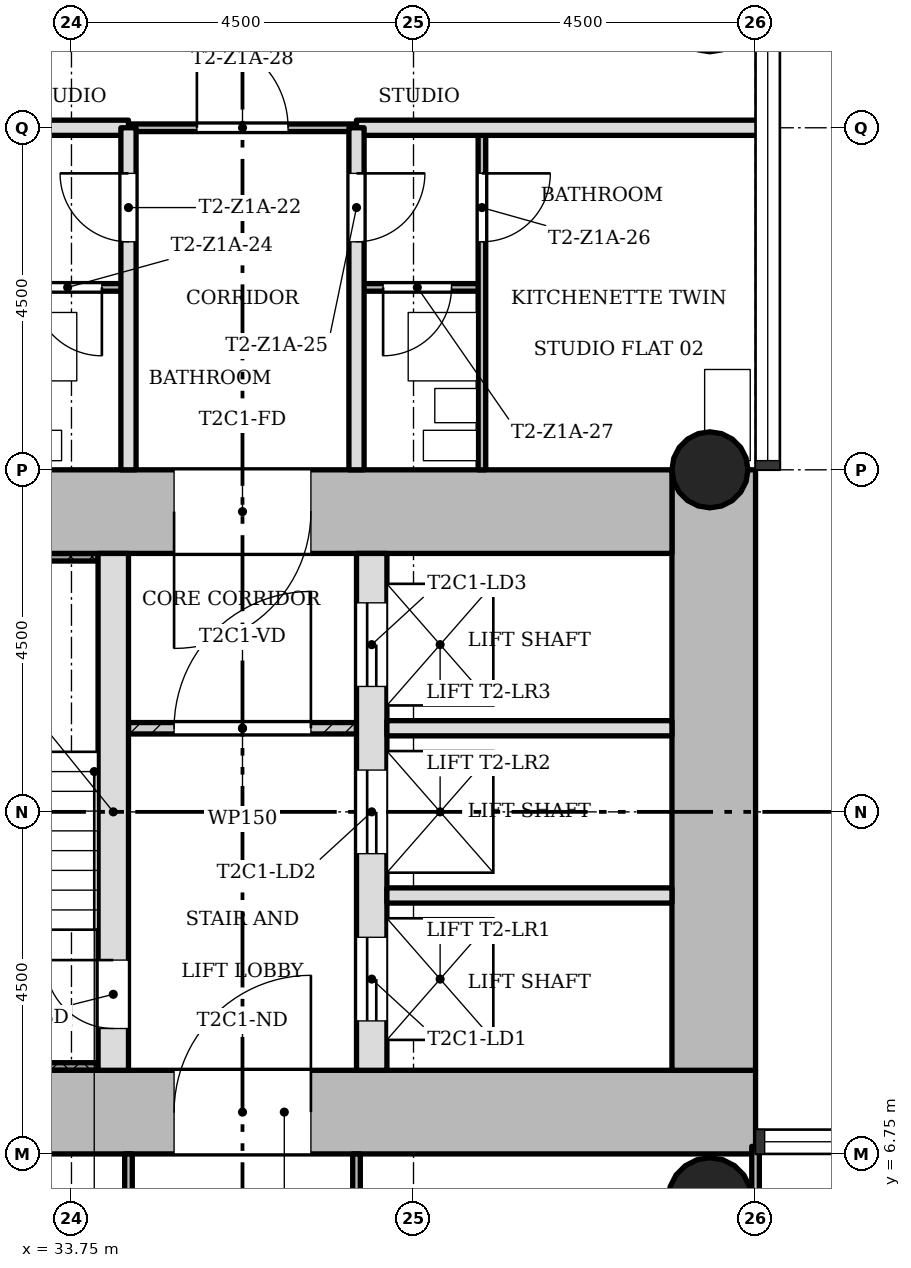
"""IFC4 building model, lengths in metres.
Left out: names, types, materials, properties, quantities, classifications, styles, units other than length and angle.
Written with IfcOpenShell. Run it as: python <this file> out.ifc"""

import sys

from ifc_helpers import new_model, si_unit, direction, frame, frame_2d, origin, origin_2d, place, context, subcontext, project, spatial, rectangle, hollow_circle, extrude, element, fill, save


model = new_model("IFC4")
c1 = context("Model", 3, precision=1e-05, world=origin(), true_north=direction((0.0, 1.0)))
c2 = subcontext(c1, "Body", "Model", "MODEL_VIEW")
j1 = project(units=[si_unit("LENGTHUNIT", "METRE"), si_unit("PLANEANGLEUNIT", "RADIAN")], contexts=[c1])
p1 = place(None, origin())
s1 = spatial("IfcSite", under=j1, at=p1, CompositionType="ELEMENT")
p2 = place(p1, origin())
s2 = spatial("IfcBuilding", under=s1, at=p2, CompositionType="ELEMENT")
p3 = place(p2, frame((0.0, 0.0, 27.9)))
s3 = spatial("IfcBuildingStorey", under=s2, at=p3, CompositionType="ELEMENT", Elevation=27.9)
p4 = place(p3, frame((30.35, 7.3, 0.0), z_axis=(0.0, 0.0, 1.0), x_axis=(1.0, 0.0, 0.0)))
e1 = element("IfcWall", 1, at=p4, inside=s3, PredefinedType="SHEAR", context=c2, shape_type="SweptSolid", body=[
    extrude(rectangle(XDim=12.4, YDim=1.1, at=frame_2d((6.2, 0.0))), origin(), (0.0, 0.0, 1.0), 3.4),
])
p5 = place(p4, frame((4.75, 0.0, 0.0)))
e2 = element("IfcOpeningElement", 2, at=p5, cuts=e1, PredefinedType="OPENING", context=c2, shape_type="SweptSolid", body=[
    extrude(rectangle(XDim=1.8, YDim=2.1, at=frame_2d((0.9, 1.05))), frame((0.0, 0.56, 0.0), z_axis=(0.0, -1.0, 0.0), x_axis=(1.0, 0.0, 0.0)), (0.0, 0.0, 1.0), 1.12),
])
p6 = place(p3, frame((42.2, 7.85, 0.0), z_axis=(0.0, 0.0, 1.0), x_axis=(0.0, 1.0, 0.0)))
e3 = element("IfcWall", 3, at=p6, inside=s3, PredefinedType="SHEAR", context=c2, shape_type="SweptSolid", body=[
    extrude(rectangle(XDim=7.9, YDim=1.1, at=frame_2d((3.95, 0.0))), origin(), (0.0, 0.0, 1.0), 3.4),
])
p7 = place(p3, frame((41.65, 15.2, 0.0), z_axis=(0.0, 0.0, 1.0), x_axis=(-1.0, 0.0, 0.0)))
e4 = element("IfcWall", 4, at=p7, inside=s3, PredefinedType="SHEAR", context=c2, shape_type="SweptSolid", body=[
    extrude(rectangle(XDim=12.4, YDim=1.1, at=frame_2d((6.2, 0.0))), origin(), (0.0, 0.0, 1.0), 3.4),
])
p8 = place(p7, frame((4.75, 0.0, 0.0)))
e5 = element("IfcOpeningElement", 5, at=p8, cuts=e4, PredefinedType="OPENING", context=c2, shape_type="SweptSolid", body=[
    extrude(rectangle(XDim=1.8, YDim=2.1, at=frame_2d((0.9, 1.05))), frame((0.0, 0.56, 0.0), z_axis=(0.0, -1.0, 0.0), x_axis=(1.0, 0.0, 0.0)), (0.0, 0.0, 1.0), 1.12),
])
p9 = place(p3, frame((34.3, 7.85, 0.0), z_axis=(0.0, 0.0, 1.0), x_axis=(0.0, 1.0, 0.0)))
e6 = element("IfcWall", 6, at=p9, inside=s3, PredefinedType="SHEAR", context=c2, shape_type="SweptSolid", body=[
    extrude(rectangle(XDim=6.8, YDim=0.4, at=frame_2d((3.4, 0.0))), origin(), (0.0, 0.0, 1.0), 3.4),
])
p10 = place(p9, frame((0.55, 0.0, 0.0)))
e7 = element("IfcOpeningElement", 7, at=p10, cuts=e6, PredefinedType="OPENING", context=c2, shape_type="SweptSolid", body=[
    extrude(rectangle(XDim=0.9, YDim=2.1, at=frame_2d((0.45, 1.05))), frame((0.0, 0.21, 0.0), z_axis=(0.0, -1.0, 0.0), x_axis=(1.0, 0.0, 0.0)), (0.0, 0.0, 1.0), 0.42),
])
p11 = place(p3, frame((37.7, 7.85, 0.0), z_axis=(0.0, 0.0, 1.0), x_axis=(0.0, 1.0, 0.0)))
e8 = element("IfcWall", 8, at=p11, inside=s3, PredefinedType="SHEAR", context=c2, shape_type="SweptSolid", body=[
    extrude(rectangle(XDim=6.8, YDim=0.4, at=frame_2d((3.4, 0.0))), origin(), (0.0, 0.0, 1.0), 3.4),
])
p12 = place(p11, frame((0.65, 0.0, 0.0)))
e9 = element("IfcOpeningElement", 9, at=p12, cuts=e8, PredefinedType="OPENING", context=c2, shape_type="SweptSolid", body=[
    extrude(rectangle(XDim=1.1, YDim=2.1, at=frame_2d((0.55, 1.05))), frame((0.0, 0.21, 0.0), z_axis=(0.0, -1.0, 0.0), x_axis=(1.0, 0.0, 0.0)), (0.0, 0.0, 1.0), 0.42),
])
p13 = place(p11, frame((2.85, 0.0, 0.0)))
e10 = element("IfcOpeningElement", 10, at=p13, cuts=e8, PredefinedType="OPENING", context=c2, shape_type="SweptSolid", body=[
    extrude(rectangle(XDim=1.1, YDim=2.1, at=frame_2d((0.55, 1.05))), frame((0.0, 0.21, 0.0), z_axis=(0.0, -1.0, 0.0), x_axis=(1.0, 0.0, 0.0)), (0.0, 0.0, 1.0), 0.42),
])
p14 = place(p11, frame((5.05, 0.0, 0.0)))
e11 = element("IfcOpeningElement", 11, at=p14, cuts=e8, PredefinedType="OPENING", context=c2, shape_type="SweptSolid", body=[
    extrude(rectangle(XDim=1.1, YDim=2.1, at=frame_2d((0.55, 1.05))), frame((0.0, 0.21, 0.0), z_axis=(0.0, -1.0, 0.0), x_axis=(1.0, 0.0, 0.0)), (0.0, 0.0, 1.0), 0.42),
])
p15 = place(p3, frame((42.15, 15.75, 0.0), z_axis=(0.0, 0.0, 1.0), x_axis=(1.0, 0.0, 0.0)))
e12 = element("IfcColumn", 12, at=p15, inside=s3, PredefinedType="COLUMN", context=c2, shape_type="SweptSolid", body=[
    extrude(hollow_circle(Radius=0.5, WallThickness=0.036, at=origin_2d()), origin(), (0.0, 0.0, 1.0), 3.4),
])
p16 = place(p3, frame((42.15, 6.15, 0.0), z_axis=(0.0, 0.0, 1.0), x_axis=(1.0, 0.0, 0.0)))
e13 = element("IfcColumn", 13, at=p16, inside=s3, PredefinedType="COLUMN", context=c2, shape_type="SweptSolid", body=[
    extrude(hollow_circle(Radius=0.55, WallThickness=0.04, at=origin_2d()), origin(), (0.0, 0.0, 1.0), 3.4),
])
p17 = place(p3, frame((37.5, 12.35, 0.0), z_axis=(0.0, 0.0, 1.0), x_axis=(-1.0, 0.0, 0.0)))
e14 = element("IfcWall", 14, at=p17, inside=s3, PredefinedType="PARTITIONING", context=c2, shape_type="SweptSolid", body=[
    extrude(rectangle(XDim=3.0, YDim=0.15, at=frame_2d((1.5, 0.0))), origin(), (0.0, 0.0, 1.0), 3.0),
])
p18 = place(p17, frame((0.6, 0.0, 0.0)))
e15 = element("IfcOpeningElement", 15, at=p18, cuts=e14, PredefinedType="OPENING", context=c2, shape_type="SweptSolid", body=[
    extrude(rectangle(XDim=1.8, YDim=2.1, at=frame_2d((0.9, 1.05))), frame((0.0, 0.085, 0.0), z_axis=(0.0, -1.0, 0.0), x_axis=(1.0, 0.0, 0.0)), (0.0, 0.0, 1.0), 0.17),
])
for number, where, z_axis, x_axis in (
    (16, (41.65, 10.15, 0.0), (0.0, 0.0, 1.0), (-1.0, 0.0, 0.0)),
    (17, (41.65, 12.35, 0.0), (0.0, 0.0, 1.0), (-1.0, 0.0, 0.0)),
):
    element("IfcWall", number, at=place(p3, frame(where, z_axis=z_axis, x_axis=x_axis)), inside=s3, PredefinedType="SOLIDWALL", context=c2, shape_type="SweptSolid", body=[
        extrude(rectangle(XDim=3.75, YDim=0.2, at=frame_2d((1.875, 0.0))), origin(), (0.0, 0.0, 1.0), 3.0),
    ])
p19 = place(p3, frame((39.15, 18.15, 0.0), z_axis=(0.0, 0.0, 1.0), x_axis=(-1.0, 0.0, 0.0)))
e18 = element("IfcWall", 18, at=p19, inside=s3, PredefinedType="PARTITIONING", context=c2, shape_type="SweptSolid", body=[
    extrude(rectangle(XDim=1.65, YDim=0.1, at=frame_2d((0.825, 0.0))), origin(), (0.0, 0.0, 1.0), 3.0),
])
p20 = place(p19, frame((0.4, 0.0, 0.0)))
e19 = element("IfcOpeningElement", 19, at=p20, cuts=e18, PredefinedType="OPENING", context=c2, shape_type="SweptSolid", body=[
    extrude(rectangle(XDim=0.9, YDim=2.1, at=frame_2d((0.45, 1.05))), frame((0.0, 0.06, 0.0), z_axis=(0.0, -1.0, 0.0), x_axis=(1.0, 0.0, 0.0)), (0.0, 0.0, 1.0), 0.12),
])
p21 = place(p3, frame((34.5, 18.15, 0.0), z_axis=(0.0, 0.0, 1.0), x_axis=(-1.0, 0.0, 0.0)))
e20 = element("IfcWall", 20, at=p21, inside=s3, PredefinedType="PARTITIONING", context=c2, shape_type="SweptSolid", body=[
    extrude(rectangle(XDim=1.65, YDim=0.1, at=frame_2d((0.825, 0.0))), origin(), (0.0, 0.0, 1.0), 3.0),
])
p22 = place(p21, frame((0.35, 0.0, 0.0)))
e21 = element("IfcOpeningElement", 21, at=p22, cuts=e20, PredefinedType="OPENING", context=c2, shape_type="SweptSolid", body=[
    extrude(rectangle(XDim=0.9, YDim=2.1, at=frame_2d((0.45, 1.05))), frame((0.0, 0.06, 0.0), z_axis=(0.0, -1.0, 0.0), x_axis=(1.0, 0.0, 0.0)), (0.0, 0.0, 1.0), 0.12),
])
p23 = place(p3, frame((37.5, 20.25, 0.0), z_axis=(0.0, 0.0, 1.0), x_axis=(-1.0, 0.0, 0.0)))
e22 = element("IfcWall", 22, at=p23, inside=s3, PredefinedType="PARTITIONING", context=c2, shape_type="SweptSolid", body=[
    extrude(rectangle(XDim=3.0, YDim=0.1, at=frame_2d((1.5, 0.0))), origin(), (0.0, 0.0, 1.0), 3.0),
])
p24 = place(p23, frame((0.9, 0.0, 0.0)))
e23 = element("IfcOpeningElement", 23, at=p24, cuts=e22, PredefinedType="OPENING", context=c2, shape_type="SweptSolid", body=[
    extrude(rectangle(XDim=1.2, YDim=2.1, at=frame_2d((0.6, 1.05))), frame((0.0, 0.06, 0.0), z_axis=(0.0, -1.0, 0.0), x_axis=(1.0, 0.0, 0.0)), (0.0, 0.0, 1.0), 0.12),
])
for number, where, z_axis, x_axis in (
    (24, (42.85, 20.25, 0.0), (0.0, 0.0, 1.0), (-1.0, 0.0, 0.0)),
    (25, (34.5, 20.25, 0.0), (0.0, 0.0, 1.0), (-1.0, 0.0, 0.0)),
):
    element("IfcWall", number, at=place(p3, frame(where, z_axis=z_axis, x_axis=x_axis)), inside=s3, PredefinedType="SOLIDWALL", context=c2, shape_type="SweptSolid", body=[
        extrude(rectangle(XDim=5.35, YDim=0.2, at=frame_2d((2.675, 0.0))), origin(), (0.0, 0.0, 1.0), 3.0),
    ])
p25 = place(p3, frame((42.75, 0.9, 0.0), z_axis=(0.0, 0.0, 1.0), x_axis=(0.0, 1.0, 0.0)))
e26 = element("IfcWall", 26, at=p25, inside=s3, PredefinedType="PARTITIONING", context=c2, shape_type="SweptSolid", body=[
    extrude(rectangle(XDim=5.95, YDim=0.1, at=frame_2d((2.975, 0.0))), origin(), (0.0, 0.0, 1.0), 3.0),
])
p26 = place(p3, frame((39.15, 15.75, 0.0), z_axis=(0.0, 0.0, 1.0), x_axis=(0.0, 1.0, 0.0)))
e27 = element("IfcWall", 27, at=p26, inside=s3, PredefinedType="PARTITIONING", context=c2, shape_type="SweptSolid", body=[
    extrude(rectangle(XDim=4.5, YDim=0.1, at=frame_2d((2.25, 0.0))), origin(), (0.0, 0.0, 1.0), 3.0),
])
p27 = place(p26, frame((3.0, 0.0, 0.0)))
e28 = element("IfcOpeningElement", 28, at=p27, cuts=e27, PredefinedType="OPENING", context=c2, shape_type="SweptSolid", body=[
    extrude(rectangle(XDim=0.9, YDim=2.1, at=frame_2d((0.45, 1.05))), frame((0.0, 0.06, 0.0), z_axis=(0.0, -1.0, 0.0), x_axis=(1.0, 0.0, 0.0)), (0.0, 0.0, 1.0), 0.12),
])
p28 = place(p3, frame((37.5, 0.9, 0.0), z_axis=(0.0, 0.0, 1.0), x_axis=(0.0, 1.0, 0.0)))
e29 = element("IfcWall", 29, at=p28, inside=s3, PredefinedType="PARTITIONING", context=c2, shape_type="SweptSolid", body=[
    extrude(rectangle(XDim=5.85, YDim=0.1, at=frame_2d((2.925, 0.0))), origin(), (0.0, 0.0, 1.0), 3.0),
])
p29 = place(p28, frame((2.475, 0.0, 0.0)))
e30 = element("IfcOpeningElement", 30, at=p29, cuts=e29, PredefinedType="OPENING", context=c2, shape_type="SweptSolid", body=[
    extrude(rectangle(XDim=0.9, YDim=2.1, at=frame_2d((0.45, 1.05))), frame((0.0, 0.06, 0.0), z_axis=(0.0, -1.0, 0.0), x_axis=(1.0, 0.0, 0.0)), (0.0, 0.0, 1.0), 0.12),
])
p30 = place(p3, frame((37.5, 15.75, 0.0), z_axis=(0.0, 0.0, 1.0), x_axis=(0.0, 1.0, 0.0)))
e31 = element("IfcWall", 31, at=p30, inside=s3, PredefinedType="SOLIDWALL", context=c2, shape_type="SweptSolid", body=[
    extrude(rectangle(XDim=4.5, YDim=0.2, at=frame_2d((2.25, 0.0))), origin(), (0.0, 0.0, 1.0), 3.0),
])
p31 = place(p30, frame((3.0, 0.0, 0.0)))
e32 = element("IfcOpeningElement", 32, at=p31, cuts=e31, PredefinedType="OPENING", context=c2, shape_type="SweptSolid", body=[
    extrude(rectangle(XDim=0.9, YDim=2.1, at=frame_2d((0.45, 1.05))), frame((0.0, 0.11, 0.0), z_axis=(0.0, -1.0, 0.0), x_axis=(1.0, 0.0, 0.0)), (0.0, 0.0, 1.0), 0.22),
])
p32 = place(p3, frame((34.5, 0.9, 0.0), z_axis=(0.0, 0.0, 1.0), x_axis=(0.0, 1.0, 0.0)))
e33 = element("IfcWall", 33, at=p32, inside=s3, PredefinedType="PARTITIONING", context=c2, shape_type="SweptSolid", body=[
    extrude(rectangle(XDim=5.85, YDim=0.1, at=frame_2d((2.925, 0.0))), origin(), (0.0, 0.0, 1.0), 3.0),
])
p33 = place(p32, frame((2.475, 0.0, 0.0)))
e34 = element("IfcOpeningElement", 34, at=p33, cuts=e33, PredefinedType="OPENING", context=c2, shape_type="SweptSolid", body=[
    extrude(rectangle(XDim=0.9, YDim=2.1, at=frame_2d((0.45, 1.05))), frame((0.0, 0.06, 0.0), z_axis=(0.0, -1.0, 0.0), x_axis=(1.0, 0.0, 0.0)), (0.0, 0.0, 1.0), 0.12),
])
p34 = place(p3, frame((34.5, 15.75, 0.0), z_axis=(0.0, 0.0, 1.0), x_axis=(0.0, 1.0, 0.0)))
e35 = element("IfcWall", 35, at=p34, inside=s3, PredefinedType="SOLIDWALL", context=c2, shape_type="SweptSolid", body=[
    extrude(rectangle(XDim=4.5, YDim=0.2, at=frame_2d((2.25, 0.0))), origin(), (0.0, 0.0, 1.0), 3.0),
])
p35 = place(p34, frame((3.0, 0.0, 0.0)))
e36 = element("IfcOpeningElement", 36, at=p35, cuts=e35, PredefinedType="OPENING", context=c2, shape_type="SweptSolid", body=[
    extrude(rectangle(XDim=0.9, YDim=2.1, at=frame_2d((0.45, 1.05))), frame((0.0, 0.11, 0.0), z_axis=(0.0, -1.0, 0.0), x_axis=(1.0, 0.0, 0.0)), (0.0, 0.0, 1.0), 0.22),
])
for number, where, z_axis, x_axis in (
    (37, (34.1, 14.6, 0.0), (0.0, 0.0, 1.0), (-1.0, 0.0, 0.0)),
    (38, (34.1, 7.9, 0.0), (0.0, 0.0, 1.0), (-1.0, 0.0, 0.0)),
):
    element("IfcWall", number, at=place(p3, frame(where, z_axis=z_axis, x_axis=x_axis)), inside=s3, PredefinedType="SHEAR", context=c2, shape_type="SweptSolid", body=[
        extrude(rectangle(XDim=3.75, YDim=0.1, at=frame_2d((1.875, 0.0))), origin(), (0.0, 0.0, 1.0), 3.4),
    ])
p36 = place(p18, origin())
e39 = element("IfcDoor", 39, at=p36, inside=s3, OperationType="SINGLE_SWING_LEFT", PredefinedType="DOOR", context=c2, shape_type="SweptSolid", body=[
    extrude(rectangle(XDim=1.8, YDim=2.1, at=frame_2d((0.9, 1.05))), frame((0.0, 0.025, 0.0), z_axis=(0.0, -1.0, 0.0), x_axis=(1.0, 0.0, 0.0)), (0.0, 0.0, 1.0), 0.05),
])
fill(e15, e39)
p37 = place(p35, origin())
e40 = element("IfcDoor", 40, at=p37, inside=s3, OperationType="SINGLE_SWING_LEFT", PredefinedType="DOOR", context=c2, shape_type="SweptSolid", body=[
    extrude(rectangle(XDim=0.9, YDim=2.1, at=frame_2d((0.45, 1.05))), frame((0.0, 0.025, 0.0), z_axis=(0.0, -1.0, 0.0), x_axis=(1.0, 0.0, 0.0)), (0.0, 0.0, 1.0), 0.05),
])
fill(e36, e40)
p38 = place(p22, origin())
e41 = element("IfcDoor", 41, at=p38, inside=s3, OperationType="SINGLE_SWING_RIGHT", PredefinedType="DOOR", context=c2, shape_type="SweptSolid", body=[
    extrude(rectangle(XDim=0.9, YDim=2.1, at=frame_2d((0.45, 1.05))), frame((0.0, 0.025, 0.0), z_axis=(0.0, -1.0, 0.0), x_axis=(1.0, 0.0, 0.0)), (0.0, 0.0, 1.0), 0.05),
])
fill(e21, e41)
p39 = place(p31, origin())
e42 = element("IfcDoor", 42, at=p39, inside=s3, OperationType="SINGLE_SWING_RIGHT", PredefinedType="DOOR", context=c2, shape_type="SweptSolid", body=[
    extrude(rectangle(XDim=0.9, YDim=2.1, at=frame_2d((0.45, 1.05))), frame((0.0, 0.025, 0.0), z_axis=(0.0, -1.0, 0.0), x_axis=(1.0, 0.0, 0.0)), (0.0, 0.0, 1.0), 0.05),
])
fill(e32, e42)
p40 = place(p27, origin())
e43 = element("IfcDoor", 43, at=p40, inside=s3, OperationType="SINGLE_SWING_RIGHT", PredefinedType="DOOR", context=c2, shape_type="SweptSolid", body=[
    extrude(rectangle(XDim=0.9, YDim=2.1, at=frame_2d((0.45, 1.05))), frame((0.0, 0.025, 0.0), z_axis=(0.0, -1.0, 0.0), x_axis=(1.0, 0.0, 0.0)), (0.0, 0.0, 1.0), 0.05),
])
fill(e28, e43)
p41 = place(p20, origin())
e44 = element("IfcDoor", 44, at=p41, inside=s3, OperationType="SINGLE_SWING_LEFT", PredefinedType="DOOR", context=c2, shape_type="SweptSolid", body=[
    extrude(rectangle(XDim=0.9, YDim=2.1, at=frame_2d((0.45, 1.05))), frame((0.0, 0.025, 0.0), z_axis=(0.0, -1.0, 0.0), x_axis=(1.0, 0.0, 0.0)), (0.0, 0.0, 1.0), 0.05),
])
fill(e19, e44)
p42 = place(p24, origin())
e45 = element("IfcDoor", 45, at=p42, inside=s3, OperationType="SINGLE_SWING_RIGHT", PredefinedType="DOOR", context=c2, shape_type="SweptSolid", body=[
    extrude(rectangle(XDim=1.2, YDim=2.1, at=frame_2d((0.6, 1.05))), frame((0.0, 0.025, 0.0), z_axis=(0.0, -1.0, 0.0), x_axis=(1.0, 0.0, 0.0)), (0.0, 0.0, 1.0), 0.05),
])
fill(e23, e45)
p43 = place(p10, origin())
e46 = element("IfcDoor", 46, at=p43, inside=s3, OperationType="SINGLE_SWING_LEFT", PredefinedType="DOOR", context=c2, shape_type="SweptSolid", body=[
    extrude(rectangle(XDim=0.9, YDim=2.1, at=frame_2d((0.45, 1.05))), frame((0.0, 0.025, 0.0), z_axis=(0.0, -1.0, 0.0), x_axis=(1.0, 0.0, 0.0)), (0.0, 0.0, 1.0), 0.05),
])
fill(e7, e46)
p44 = place(p12, origin())
e47 = element("IfcDoor", 47, at=p44, inside=s3, OperationType="SLIDING_TO_LEFT", PredefinedType="DOOR", context=c2, shape_type="SweptSolid", body=[
    extrude(rectangle(XDim=1.1, YDim=2.1, at=frame_2d((0.55, 1.05))), frame((0.0, 0.025, 0.0), z_axis=(0.0, -1.0, 0.0), x_axis=(1.0, 0.0, 0.0)), (0.0, 0.0, 1.0), 0.05),
])
fill(e9, e47)
p45 = place(p13, origin())
e48 = element("IfcDoor", 48, at=p45, inside=s3, OperationType="SLIDING_TO_LEFT", PredefinedType="DOOR", context=c2, shape_type="SweptSolid", body=[
    extrude(rectangle(XDim=1.1, YDim=2.1, at=frame_2d((0.55, 1.05))), frame((0.0, 0.025, 0.0), z_axis=(0.0, -1.0, 0.0), x_axis=(1.0, 0.0, 0.0)), (0.0, 0.0, 1.0), 0.05),
])
fill(e10, e48)
p46 = place(p14, origin())
e49 = element("IfcDoor", 49, at=p46, inside=s3, OperationType="SLIDING_TO_LEFT", PredefinedType="DOOR", context=c2, shape_type="SweptSolid", body=[
    extrude(rectangle(XDim=1.1, YDim=2.1, at=frame_2d((0.55, 1.05))), frame((0.0, 0.025, 0.0), z_axis=(0.0, -1.0, 0.0), x_axis=(1.0, 0.0, 0.0)), (0.0, 0.0, 1.0), 0.05),
])
fill(e11, e49)
p47 = place(p5, origin())
e50 = element("IfcDoor", 50, at=p47, inside=s3, OperationType="SINGLE_SWING_LEFT", PredefinedType="DOOR", context=c2, shape_type="SweptSolid", body=[
    extrude(rectangle(XDim=1.8, YDim=2.1, at=frame_2d((0.9, 1.05))), frame((0.0, 0.025, 0.0), z_axis=(0.0, -1.0, 0.0), x_axis=(1.0, 0.0, 0.0)), (0.0, 0.0, 1.0), 0.05),
])
fill(e2, e50)
p48 = place(p8, origin())
e51 = element("IfcDoor", 51, at=p48, inside=s3, OperationType="SINGLE_SWING_LEFT", PredefinedType="DOOR", context=c2, shape_type="SweptSolid", body=[
    extrude(rectangle(XDim=1.8, YDim=2.1, at=frame_2d((0.9, 1.05))), frame((0.0, 0.025, 0.0), z_axis=(0.0, -1.0, 0.0), x_axis=(1.0, 0.0, 0.0)), (0.0, 0.0, 1.0), 0.05),
])
fill(e5, e51)
save(model, sys.argv[1])
